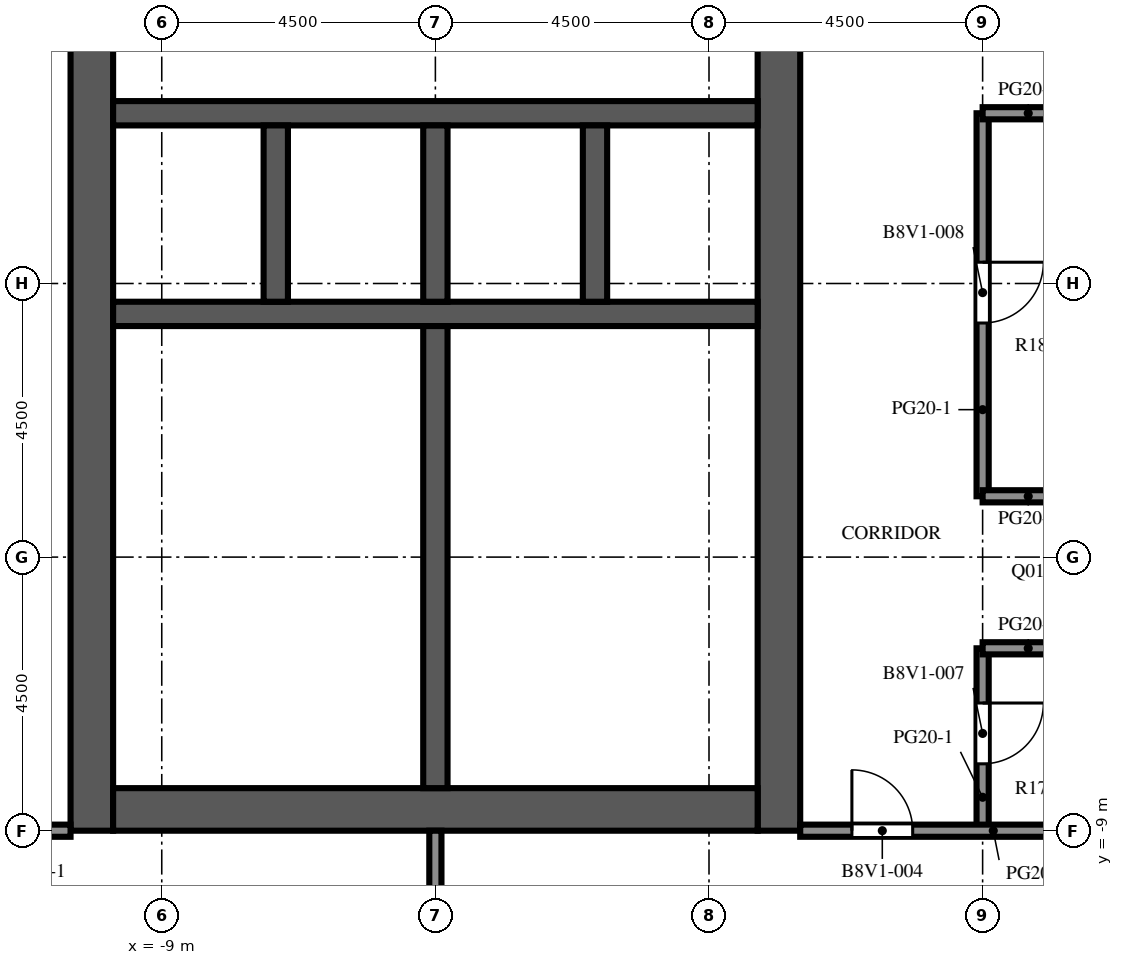
"""IFC4 building model, lengths in metres.
Left out: names, types, materials, properties, quantities, classifications, styles, units other than length and angle.
Written with IfcOpenShell. Run it as: python <this file> out.ifc"""

import sys

from ifc_helpers import new_model, si_unit, direction, frame, frame_2d, origin, place, context, subcontext, project, spatial, rectangle, extrude, element, fill, save


model = new_model("IFC4")
c1 = context("Model", 3, precision=1e-05, world=origin(), true_north=direction((0.0, 1.0)))
c2 = subcontext(c1, "Body", "Model", "MODEL_VIEW")
j1 = project(units=[si_unit("LENGTHUNIT", "METRE"), si_unit("PLANEANGLEUNIT", "RADIAN")], contexts=[c1])
p1 = place(None, origin())
s1 = spatial("IfcSite", under=j1, at=p1, CompositionType="ELEMENT")
p2 = place(p1, origin())
s2 = spatial("IfcBuilding", under=s1, at=p2, CompositionType="ELEMENT")
p3 = place(p2, frame((0.0, 0.0, 278.6)))
s3 = spatial("IfcBuildingStorey", under=s2, at=p3, CompositionType="ELEMENT", Elevation=278.6)
p4 = place(p3, frame((-10.15, -9.0, 0.0), z_axis=(0.0, 0.0, 1.0), x_axis=(0.0, 1.0, 0.0)))
e1 = element("IfcWall", 1, at=p4, inside=s3, PredefinedType="SHEAR", context=c2, shape_type="SweptSolid", body=[
    extrude(rectangle(XDim=27.5, YDim=0.7, at=frame_2d((13.75, 0.0))), origin(), (0.0, 0.0, 1.0), 4.1),
])
p5 = place(p4, frame((12.55, 0.0, 0.0)))
e2 = element("IfcOpeningElement", 2, at=p5, cuts=e1, PredefinedType="OPENING", context=c2, shape_type="SweptSolid", body=[
    extrude(rectangle(XDim=2.4, YDim=2.4, at=frame_2d((1.2, 1.2))), frame((0.0, 0.36, 0.0), z_axis=(0.0, -1.0, 0.0), x_axis=(1.0, 0.0, 0.0)), (0.0, 0.0, 1.0), 0.72),
])
p6 = place(p4, frame((6.825, 0.0, 0.0)))
e3 = element("IfcOpeningElement", 3, at=p6, cuts=e1, PredefinedType="OPENING", context=c2, shape_type="SweptSolid", body=[
    extrude(rectangle(XDim=1.2, YDim=2.1, at=frame_2d((0.6, 1.05))), frame((0.0, 0.36, 0.0), z_axis=(0.0, -1.0, 0.0), x_axis=(1.0, 0.0, 0.0)), (0.0, 0.0, 1.0), 0.72),
])
p7 = place(p4, frame((19.475, 0.0, 0.0)))
e4 = element("IfcOpeningElement", 4, at=p7, cuts=e1, PredefinedType="OPENING", context=c2, shape_type="SweptSolid", body=[
    extrude(rectangle(XDim=1.2, YDim=2.1, at=frame_2d((0.6, 1.05))), frame((0.0, 0.36, 0.0), z_axis=(0.0, -1.0, 0.0), x_axis=(1.0, 0.0, 0.0)), (0.0, 0.0, 1.0), 0.72),
])
p8 = place(p3, frame((1.15, -9.0, 0.0), z_axis=(0.0, 0.0, 1.0), x_axis=(0.0, 1.0, 0.0)))
e5 = element("IfcWall", 5, at=p8, inside=s3, PredefinedType="SHEAR", context=c2, shape_type="SweptSolid", body=[
    extrude(rectangle(XDim=27.5, YDim=0.7, at=frame_2d((13.75, 0.0))), origin(), (0.0, 0.0, 1.0), 4.1),
])
p9 = place(p8, frame((12.55, 0.0, 0.0)))
e6 = element("IfcOpeningElement", 6, at=p9, cuts=e5, PredefinedType="OPENING", context=c2, shape_type="SweptSolid", body=[
    extrude(rectangle(XDim=2.4, YDim=2.4, at=frame_2d((1.2, 1.2))), frame((0.0, 0.36, 0.0), z_axis=(0.0, -1.0, 0.0), x_axis=(1.0, 0.0, 0.0)), (0.0, 0.0, 1.0), 0.72),
])
p10 = place(p8, frame((3.9, 0.0, 0.0)))
e7 = element("IfcOpeningElement", 7, at=p10, cuts=e5, PredefinedType="OPENING", context=c2, shape_type="SweptSolid", body=[
    extrude(rectangle(XDim=1.2, YDim=2.1, at=frame_2d((0.6, 1.05))), frame((0.0, 0.36, 0.0), z_axis=(0.0, -1.0, 0.0), x_axis=(1.0, 0.0, 0.0)), (0.0, 0.0, 1.0), 0.72),
])
p11 = place(p8, frame((19.46, 0.0, 0.0)))
e8 = element("IfcOpeningElement", 8, at=p11, cuts=e5, PredefinedType="OPENING", context=c2, shape_type="SweptSolid", body=[
    extrude(rectangle(XDim=1.0, YDim=2.1, at=frame_2d((0.5, 1.05))), frame((0.0, 0.36, 0.0), z_axis=(0.0, -1.0, 0.0), x_axis=(1.0, 0.0, 0.0)), (0.0, 0.0, 1.0), 0.72),
])
p12 = place(p8, frame((21.17, 0.0, 0.0)))
e9 = element("IfcOpeningElement", 9, at=p12, cuts=e5, PredefinedType="OPENING", context=c2, shape_type="SweptSolid", body=[
    extrude(rectangle(XDim=1.0, YDim=2.1, at=frame_2d((0.5, 1.05))), frame((0.0, 0.36, 0.0), z_axis=(0.0, -1.0, 0.0), x_axis=(1.0, 0.0, 0.0)), (0.0, 0.0, 1.0), 0.72),
])
p13 = place(p8, frame((23.26, 0.0, 0.0)))
e10 = element("IfcOpeningElement", 10, at=p13, cuts=e5, PredefinedType="OPENING", context=c2, shape_type="SweptSolid", body=[
    extrude(rectangle(XDim=1.0, YDim=2.1, at=frame_2d((0.5, 1.05))), frame((0.0, 0.36, 0.0), z_axis=(0.0, -1.0, 0.0), x_axis=(1.0, 0.0, 0.0)), (0.0, 0.0, 1.0), 0.72),
])
p14 = place(p8, frame((25.35, 0.0, 0.0)))
e11 = element("IfcOpeningElement", 11, at=p14, cuts=e5, PredefinedType="OPENING", context=c2, shape_type="SweptSolid", body=[
    extrude(rectangle(XDim=1.0, YDim=2.1, at=frame_2d((0.5, 1.05))), frame((0.0, 0.36, 0.0), z_axis=(0.0, -1.0, 0.0), x_axis=(1.0, 0.0, 0.0)), (0.0, 0.0, 1.0), 0.72),
])
p15 = place(p3, frame((-9.8, -8.65, 0.0), z_axis=(0.0, 0.0, 1.0), x_axis=(1.0, 0.0, 0.0)))
e12 = element("IfcWall", 12, at=p15, inside=s3, PredefinedType="SHEAR", context=c2, shape_type="SweptSolid", body=[
    extrude(rectangle(XDim=10.6, YDim=0.7, at=frame_2d((5.3, 0.0))), origin(), (0.0, 0.0, 1.0), 4.1),
])
p16 = place(p3, frame((-9.8, -0.5, 0.0), z_axis=(0.0, 0.0, 1.0), x_axis=(1.0, 0.0, 0.0)))
e13 = element("IfcWall", 13, at=p16, inside=s3, PredefinedType="SHEAR", context=c2, shape_type="SweptSolid", body=[
    extrude(rectangle(XDim=10.6, YDim=0.4, at=frame_2d((5.3, 0.0))), origin(), (0.0, 0.0, 1.0), 4.1),
])
p17 = place(p3, frame((-9.8, 2.8, 0.0), z_axis=(0.0, 0.0, 1.0), x_axis=(1.0, 0.0, 0.0)))
e14 = element("IfcWall", 14, at=p17, inside=s3, PredefinedType="SHEAR", context=c2, shape_type="SweptSolid", body=[
    extrude(rectangle(XDim=10.6, YDim=0.4, at=frame_2d((5.3, 0.0))), origin(), (0.0, 0.0, 1.0), 4.1),
])
p18 = place(p17, frame((0.688, 0.0, 0.0)))
e15 = element("IfcOpeningElement", 15, at=p18, cuts=e14, PredefinedType="OPENING", context=c2, shape_type="SweptSolid", body=[
    extrude(rectangle(XDim=1.1, YDim=2.1, at=frame_2d((0.55, 1.05))), frame((0.0, 0.21, 0.0), z_axis=(0.0, -1.0, 0.0), x_axis=(1.0, 0.0, 0.0)), (0.0, 0.0, 1.0), 0.42),
])
p19 = place(p17, frame((3.438, 0.0, 0.0)))
e16 = element("IfcOpeningElement", 16, at=p19, cuts=e14, PredefinedType="OPENING", context=c2, shape_type="SweptSolid", body=[
    extrude(rectangle(XDim=1.1, YDim=2.1, at=frame_2d((0.55, 1.05))), frame((0.0, 0.21, 0.0), z_axis=(0.0, -1.0, 0.0), x_axis=(1.0, 0.0, 0.0)), (0.0, 0.0, 1.0), 0.42),
])
p20 = place(p17, frame((6.113, 0.0, 0.0)))
e17 = element("IfcOpeningElement", 17, at=p20, cuts=e14, PredefinedType="OPENING", context=c2, shape_type="SweptSolid", body=[
    extrude(rectangle(XDim=1.0, YDim=2.1, at=frame_2d((0.5, 1.05))), frame((0.0, 0.21, 0.0), z_axis=(0.0, -1.0, 0.0), x_axis=(1.0, 0.0, 0.0)), (0.0, 0.0, 1.0), 0.42),
])
p21 = place(p17, frame((8.863, 0.0, 0.0)))
e18 = element("IfcOpeningElement", 18, at=p21, cuts=e14, PredefinedType="OPENING", context=c2, shape_type="SweptSolid", body=[
    extrude(rectangle(XDim=1.0, YDim=2.1, at=frame_2d((0.5, 1.05))), frame((0.0, 0.21, 0.0), z_axis=(0.0, -1.0, 0.0), x_axis=(1.0, 0.0, 0.0)), (0.0, 0.0, 1.0), 0.42),
])
for number, where, z_axis, x_axis in (
    (19, (-7.125, -0.3, 0.0), (0.0, 0.0, 1.0), (0.0, 1.0, 0.0)),
    (20, (-4.5, -0.3, 0.0), (0.0, 0.0, 1.0), (0.0, 1.0, 0.0)),
    (21, (-1.875, -0.3, 0.0), (0.0, 0.0, 1.0), (0.0, 1.0, 0.0)),
):
    element("IfcWall", number, at=place(p3, frame(where, z_axis=z_axis, x_axis=x_axis)), inside=s3, PredefinedType="SHEAR", context=c2, shape_type="SweptSolid", body=[
        extrude(rectangle(XDim=2.9, YDim=0.4, at=frame_2d((1.45, 0.0))), origin(), (0.0, 0.0, 1.0), 4.1),
    ])
p22 = place(p3, frame((-4.5, -8.3, 0.0), z_axis=(0.0, 0.0, 1.0), x_axis=(0.0, 1.0, 0.0)))
e22 = element("IfcWall", 22, at=p22, inside=s3, PredefinedType="SHEAR", context=c2, shape_type="SweptSolid", body=[
    extrude(rectangle(XDim=7.6, YDim=0.4, at=frame_2d((3.8, 0.0))), origin(), (0.0, 0.0, 1.0), 4.1),
])
p23 = place(p3, frame((-0.8, -6.02, 0.0), z_axis=(0.0, 0.0, 1.0), x_axis=(1.0, 0.0, 0.0)))
e23 = element("IfcWall", 23, at=p23, inside=s3, PredefinedType="PARTITIONING", context=c2, shape_type="SweptSolid", body=[
    extrude(rectangle(XDim=1.6, YDim=0.1, at=frame_2d((0.8, 0.0))), origin(), (0.0, 0.0, 1.0), 3.65),
])
p24 = place(p23, frame((0.3, 0.0, 0.0)))
e24 = element("IfcOpeningElement", 24, at=p24, cuts=e23, PredefinedType="OPENING", context=c2, shape_type="SweptSolid", body=[
    extrude(rectangle(XDim=1.0, YDim=2.1, at=frame_2d((0.5, 1.05))), frame((0.0, 0.06, 0.0), z_axis=(0.0, -1.0, 0.0), x_axis=(1.0, 0.0, 0.0)), (0.0, 0.0, 1.0), 0.12),
])
p25 = place(p3, frame((-0.8, -2.98, 0.0), z_axis=(0.0, 0.0, 1.0), x_axis=(1.0, 0.0, 0.0)))
e25 = element("IfcWall", 25, at=p25, inside=s3, PredefinedType="PARTITIONING", context=c2, shape_type="SweptSolid", body=[
    extrude(rectangle(XDim=1.6, YDim=0.1, at=frame_2d((0.8, 0.0))), origin(), (0.0, 0.0, 1.0), 3.65),
])
p26 = place(p25, frame((0.3, 0.0, 0.0)))
e26 = element("IfcOpeningElement", 26, at=p26, cuts=e25, PredefinedType="OPENING", context=c2, shape_type="SweptSolid", body=[
    extrude(rectangle(XDim=1.0, YDim=2.1, at=frame_2d((0.5, 1.05))), frame((0.0, 0.06, 0.0), z_axis=(0.0, -1.0, 0.0), x_axis=(1.0, 0.0, 0.0)), (0.0, 0.0, 1.0), 0.12),
])
p27 = place(p3, frame((-0.8, -6.02, 0.0), z_axis=(0.0, 0.0, 1.0), x_axis=(0.0, 1.0, 0.0)))
e27 = element("IfcWall", 27, at=p27, inside=s3, PredefinedType="PARTITIONING", context=c2, shape_type="SweptSolid", body=[
    extrude(rectangle(XDim=3.04, YDim=0.1, at=frame_2d((1.52, 0.0))), origin(), (0.0, 0.0, 1.0), 3.65),
])
p28 = place(p27, frame((1.02, 0.0, 0.0)))
e28 = element("IfcOpeningElement", 28, at=p28, cuts=e27, PredefinedType="OPENING", context=c2, shape_type="SweptSolid", body=[
    extrude(rectangle(XDim=1.0, YDim=2.1, at=frame_2d((0.5, 1.05))), frame((0.0, 0.06, 0.0), z_axis=(0.0, -1.0, 0.0), x_axis=(1.0, 0.0, 0.0)), (0.0, 0.0, 1.0), 0.12),
])
for number, where, z_axis, x_axis in (
    (29, (-4.3, -6.02, 0.0), (0.0, 0.0, 1.0), (1.0, 0.0, 0.0)),
    (30, (-4.3, -2.98, 0.0), (0.0, 0.0, 1.0), (1.0, 0.0, 0.0)),
):
    element("IfcWall", number, at=place(p3, frame(where, z_axis=z_axis, x_axis=x_axis)), inside=s3, PredefinedType="PARTITIONING", context=c2, shape_type="SweptSolid", body=[
        extrude(rectangle(XDim=3.5, YDim=0.1, at=frame_2d((1.75, 0.0))), origin(), (0.0, 0.0, 1.0), 3.65),
    ])
p29 = place(p3, frame((-4.5, -17.6, 0.0), z_axis=(0.0, 0.0, 1.0), x_axis=(0.0, 1.0, 0.0)))
e31 = element("IfcWall", 31, at=p29, inside=s3, PredefinedType="PARTITIONING", context=c2, shape_type="SweptSolid", body=[
    extrude(rectangle(XDim=8.6, YDim=0.2, at=frame_2d((4.3, 0.0))), origin(), (0.0, 0.0, 1.0), 3.65),
])
p30 = place(p3, frame((4.5, -6.0, 0.0), z_axis=(0.0, 0.0, 1.0), x_axis=(0.0, -1.0, 0.0)))
e32 = element("IfcWall", 32, at=p30, inside=s3, PredefinedType="PARTITIONING", context=c2, shape_type="SweptSolid", body=[
    extrude(rectangle(XDim=3.0, YDim=0.2, at=frame_2d((1.5, 0.0))), origin(), (0.0, 0.0, 1.0), 3.65),
])
p31 = place(p30, frame((0.9, 0.0, 0.0)))
e33 = element("IfcOpeningElement", 33, at=p31, cuts=e32, PredefinedType="OPENING", context=c2, shape_type="SweptSolid", body=[
    extrude(rectangle(XDim=1.0, YDim=2.1, at=frame_2d((0.5, 1.05))), frame((0.0, 0.11, 0.0), z_axis=(0.0, -1.0, 0.0), x_axis=(1.0, 0.0, 0.0)), (0.0, 0.0, 1.0), 0.22),
])
p32 = place(p3, frame((4.5, 2.8, 0.0), z_axis=(0.0, 0.0, 1.0), x_axis=(0.0, -1.0, 0.0)))
e34 = element("IfcWall", 34, at=p32, inside=s3, PredefinedType="PARTITIONING", context=c2, shape_type="SweptSolid", body=[
    extrude(rectangle(XDim=6.3, YDim=0.2, at=frame_2d((3.15, 0.0))), origin(), (0.0, 0.0, 1.0), 3.65),
])
p33 = place(p32, frame((2.45, 0.0, 0.0)))
e35 = element("IfcOpeningElement", 35, at=p33, cuts=e34, PredefinedType="OPENING", context=c2, shape_type="SweptSolid", body=[
    extrude(rectangle(XDim=1.0, YDim=2.1, at=frame_2d((0.5, 1.05))), frame((0.0, 0.11, 0.0), z_axis=(0.0, -1.0, 0.0), x_axis=(1.0, 0.0, 0.0)), (0.0, 0.0, 1.0), 0.22),
])
p34 = place(p3, frame((-10.5, -9.0, 0.0), z_axis=(0.0, 0.0, 1.0), x_axis=(-1.0, 0.0, 0.0)))
e36 = element("IfcWall", 36, at=p34, inside=s3, PredefinedType="PARTITIONING", context=c2, shape_type="SweptSolid", body=[
    extrude(rectangle(XDim=3.0, YDim=0.2, at=frame_2d((1.5, 0.0))), origin(), (0.0, 0.0, 1.0), 3.65),
])
p35 = place(p34, frame((1.15, 0.0, 0.0)))
e37 = element("IfcOpeningElement", 37, at=p35, cuts=e36, PredefinedType="OPENING", context=c2, shape_type="SweptSolid", body=[
    extrude(rectangle(XDim=1.0, YDim=2.1, at=frame_2d((0.5, 1.05))), frame((0.0, 0.11, 0.0), z_axis=(0.0, -1.0, 0.0), x_axis=(1.0, 0.0, 0.0)), (0.0, 0.0, 1.0), 0.22),
])
p36 = place(p3, frame((6.0, -9.0, 0.0), z_axis=(0.0, 0.0, 1.0), x_axis=(-1.0, 0.0, 0.0)))
e38 = element("IfcWall", 38, at=p36, inside=s3, PredefinedType="PARTITIONING", context=c2, shape_type="SweptSolid", body=[
    extrude(rectangle(XDim=4.5, YDim=0.2, at=frame_2d((2.25, 0.0))), origin(), (0.0, 0.0, 1.0), 3.65),
])
p37 = place(p36, frame((2.65, 0.0, 0.0)))
e39 = element("IfcOpeningElement", 39, at=p37, cuts=e38, PredefinedType="OPENING", context=c2, shape_type="SweptSolid", body=[
    extrude(rectangle(XDim=1.0, YDim=2.1, at=frame_2d((0.5, 1.05))), frame((0.0, 0.11, 0.0), z_axis=(0.0, -1.0, 0.0), x_axis=(1.0, 0.0, 0.0)), (0.0, 0.0, 1.0), 0.22),
])
for number, where, z_axis, x_axis in (
    (40, (4.5, -6.0, 0.0), (0.0, 0.0, 1.0), (1.0, 0.0, 0.0)),
    (41, (4.5, -3.5, 0.0), (0.0, 0.0, 1.0), (1.0, 0.0, 0.0)),
    (42, (4.5, 2.8, 0.0), (0.0, 0.0, 1.0), (1.0, 0.0, 0.0)),
):
    element("IfcWall", number, at=place(p3, frame(where, z_axis=z_axis, x_axis=x_axis)), inside=s3, PredefinedType="PARTITIONING", context=c2, shape_type="SweptSolid", body=[
        extrude(rectangle(XDim=1.5, YDim=0.2, at=frame_2d((0.75, 0.0))), origin(), (0.0, 0.0, 1.0), 3.65),
    ])
p38 = place(p18, origin())
e43 = element("IfcDoor", 43, at=p38, inside=s3, OperationType="DOUBLE_DOOR_SLIDING", PredefinedType="DOOR", context=c2, shape_type="SweptSolid", body=[
    extrude(rectangle(XDim=1.1, YDim=2.1, at=frame_2d((0.55, 1.05))), frame((0.0, 0.025, 0.0), z_axis=(0.0, -1.0, 0.0), x_axis=(1.0, 0.0, 0.0)), (0.0, 0.0, 1.0), 0.05),
])
fill(e15, e43)
p39 = place(p19, origin())
e44 = element("IfcDoor", 44, at=p39, inside=s3, OperationType="DOUBLE_DOOR_SLIDING", PredefinedType="DOOR", context=c2, shape_type="SweptSolid", body=[
    extrude(rectangle(XDim=1.1, YDim=2.1, at=frame_2d((0.55, 1.05))), frame((0.0, 0.025, 0.0), z_axis=(0.0, -1.0, 0.0), x_axis=(1.0, 0.0, 0.0)), (0.0, 0.0, 1.0), 0.05),
])
fill(e16, e44)
p40 = place(p5, origin())
e45 = element("IfcDoor", 45, at=p40, inside=s3, OperationType="DOUBLE_DOOR_DOUBLE_SWING", PredefinedType="DOOR", context=c2, shape_type="SweptSolid", body=[
    extrude(rectangle(XDim=2.4, YDim=2.4, at=frame_2d((1.2, 1.2))), frame((0.0, 0.025, 0.0), z_axis=(0.0, -1.0, 0.0), x_axis=(1.0, 0.0, 0.0)), (0.0, 0.0, 1.0), 0.05),
])
fill(e2, e45)
p41 = place(p9, origin())
e46 = element("IfcDoor", 46, at=p41, inside=s3, OperationType="DOUBLE_DOOR_DOUBLE_SWING", PredefinedType="DOOR", context=c2, shape_type="SweptSolid", body=[
    extrude(rectangle(XDim=2.4, YDim=2.4, at=frame_2d((1.2, 1.2))), frame((0.0, 0.025, 0.0), z_axis=(0.0, -1.0, 0.0), x_axis=(1.0, 0.0, 0.0)), (0.0, 0.0, 1.0), 0.05),
])
fill(e6, e46)
p42 = place(p6, origin())
e47 = element("IfcDoor", 47, at=p42, inside=s3, OperationType="SINGLE_SWING_LEFT", PredefinedType="DOOR", context=c2, shape_type="SweptSolid", body=[
    extrude(rectangle(XDim=1.2, YDim=2.1, at=frame_2d((0.6, 1.05))), frame((0.0, 0.025, 0.0), z_axis=(0.0, -1.0, 0.0), x_axis=(1.0, 0.0, 0.0)), (0.0, 0.0, 1.0), 0.05),
])
fill(e3, e47)
p43 = place(p20, origin())
e48 = element("IfcDoor", 48, at=p43, inside=s3, OperationType="SINGLE_SWING_LEFT", PredefinedType="DOOR", context=c2, shape_type="SweptSolid", body=[
    extrude(rectangle(XDim=1.0, YDim=2.1, at=frame_2d((0.5, 1.05))), frame((0.0, 0.025, 0.0), z_axis=(0.0, -1.0, 0.0), x_axis=(1.0, 0.0, 0.0)), (0.0, 0.0, 1.0), 0.05),
])
fill(e17, e48)
p44 = place(p21, origin())
e49 = element("IfcDoor", 49, at=p44, inside=s3, OperationType="SINGLE_SWING_RIGHT", PredefinedType="DOOR", context=c2, shape_type="SweptSolid", body=[
    extrude(rectangle(XDim=1.0, YDim=2.1, at=frame_2d((0.5, 1.05))), frame((0.0, 0.025, 0.0), z_axis=(0.0, -1.0, 0.0), x_axis=(1.0, 0.0, 0.0)), (0.0, 0.0, 1.0), 0.05),
])
fill(e18, e49)
p45 = place(p10, origin())
e50 = element("IfcDoor", 50, at=p45, inside=s3, OperationType="SINGLE_SWING_LEFT", PredefinedType="DOOR", context=c2, shape_type="SweptSolid", body=[
    extrude(rectangle(XDim=1.2, YDim=2.1, at=frame_2d((0.6, 1.05))), frame((0.0, 0.325, 0.0), z_axis=(0.0, -1.0, 0.0), x_axis=(1.0, 0.0, 0.0)), (0.0, 0.0, 1.0), 0.05),
])
fill(e7, e50)
p46 = place(p24, origin())
e51 = element("IfcDoor", 51, at=p46, inside=s3, OperationType="SINGLE_SWING_RIGHT", PredefinedType="DOOR", context=c2, shape_type="SweptSolid", body=[
    extrude(rectangle(XDim=1.0, YDim=2.1, at=frame_2d((0.5, 1.05))), frame((0.0, 0.025, 0.0), z_axis=(0.0, -1.0, 0.0), x_axis=(1.0, 0.0, 0.0)), (0.0, 0.0, 1.0), 0.05),
])
fill(e24, e51)
p47 = place(p26, origin())
e52 = element("IfcDoor", 52, at=p47, inside=s3, OperationType="SINGLE_SWING_LEFT", PredefinedType="DOOR", context=c2, shape_type="SweptSolid", body=[
    extrude(rectangle(XDim=1.0, YDim=2.1, at=frame_2d((0.5, 1.05))), frame((0.0, 0.025, 0.0), z_axis=(0.0, -1.0, 0.0), x_axis=(1.0, 0.0, 0.0)), (0.0, 0.0, 1.0), 0.05),
])
fill(e26, e52)
p48 = place(p28, origin())
e53 = element("IfcDoor", 53, at=p48, inside=s3, OperationType="SINGLE_SWING_RIGHT", PredefinedType="DOOR", context=c2, shape_type="SweptSolid", body=[
    extrude(rectangle(XDim=1.0, YDim=2.1, at=frame_2d((0.5, 1.05))), frame((0.0, 0.025, 0.0), z_axis=(0.0, -1.0, 0.0), x_axis=(1.0, 0.0, 0.0)), (0.0, 0.0, 1.0), 0.05),
])
fill(e28, e53)
p49 = place(p37, origin())
e54 = element("IfcDoor", 54, at=p49, inside=s3, OperationType="SINGLE_SWING_RIGHT", PredefinedType="DOOR", context=c2, shape_type="SweptSolid", body=[
    extrude(rectangle(XDim=1.0, YDim=2.1, at=frame_2d((0.5, 1.05))), frame((0.0, 0.025, 0.0), z_axis=(0.0, -1.0, 0.0), x_axis=(1.0, 0.0, 0.0)), (0.0, 0.0, 1.0), 0.05),
])
fill(e39, e54)
p50 = place(p31, origin())
e55 = element("IfcDoor", 55, at=p50, inside=s3, OperationType="SINGLE_SWING_LEFT", PredefinedType="DOOR", context=c2, shape_type="SweptSolid", body=[
    extrude(rectangle(XDim=1.0, YDim=2.1, at=frame_2d((0.5, 1.05))), frame((0.0, 0.025, 0.0), z_axis=(0.0, -1.0, 0.0), x_axis=(1.0, 0.0, 0.0)), (0.0, 0.0, 1.0), 0.05),
])
fill(e33, e55)
p51 = place(p33, origin())
e56 = element("IfcDoor", 56, at=p51, inside=s3, OperationType="SINGLE_SWING_LEFT", PredefinedType="DOOR", context=c2, shape_type="SweptSolid", body=[
    extrude(rectangle(XDim=1.0, YDim=2.1, at=frame_2d((0.5, 1.05))), frame((0.0, 0.025, 0.0), z_axis=(0.0, -1.0, 0.0), x_axis=(1.0, 0.0, 0.0)), (0.0, 0.0, 1.0), 0.05),
])
fill(e35, e56)
save(model, sys.argv[1])
